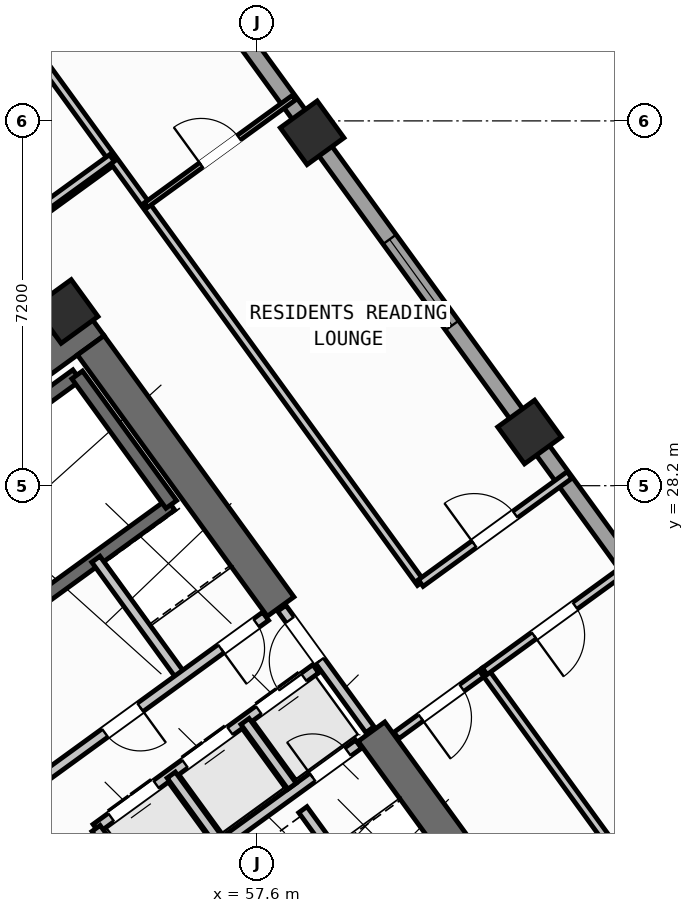
"""IFC4 building model, lengths in metres.
Left out: names, types, materials, properties, quantities, classifications, styles, units other than length and angle.
Written with IfcOpenShell. Run it as: python <this file> out.ifc"""

import sys

from ifc_helpers import new_model, si_unit, direction, frame, frame_2d, origin, origin_2d, place, context, subcontext, project, spatial, rectangle, hollow_rectangle, extrude, source, transform, mapped, element, fill, save


model = new_model("IFC4")
c1 = context("Model", 3, precision=1e-05, world=origin(), true_north=direction((0.0, 1.0)))
c2 = subcontext(c1, "Body", "Model", "MODEL_VIEW")
j1 = project(units=[si_unit("LENGTHUNIT", "METRE"), si_unit("PLANEANGLEUNIT", "RADIAN")], contexts=[c1])
p1 = place(None, origin())
s1 = spatial("IfcSite", under=j1, at=p1, CompositionType="ELEMENT")
p2 = place(p1, origin())
s2 = spatial("IfcBuilding", under=s1, at=p2, CompositionType="ELEMENT")
p3 = place(p2, frame((0.0, 0.0, 90.0)))
s3 = spatial("IfcBuildingStorey", under=s2, at=p3, CompositionType="ELEMENT", Elevation=90.0)
p4 = place(p3, frame((44.325, 24.113, 0.0), z_axis=(0.0, 0.0, 1.0), x_axis=(0.809012664862, 0.58779121131, 0.0)))
e1 = element("IfcWall", 1, at=p4, inside=s3, PredefinedType="SHEAR", context=c2, shape_type="SweptSolid", body=[
    extrude(rectangle(XDim=12.44, YDim=0.65, at=frame_2d((6.22, 0.0))), origin(), (0.0, 0.0, 1.0), 3.35),
])
p5 = place(p3, frame((61.929, 20.494, 0.0), z_axis=(0.0, 0.0, 1.0), x_axis=(-0.58782982593, 0.808984607855, 0.0)))
e2 = element("IfcWall", 2, at=p5, inside=s3, PredefinedType="SHEAR", context=c2, shape_type="SweptSolid", body=[
    extrude(rectangle(XDim=3.525, YDim=0.65, at=frame_2d((1.762, 0.0))), origin(), (0.0, 0.0, 1.0), 3.35),
])
p6 = place(p3, frame((58.064, 25.813, 0.0), z_axis=(0.0, 0.0, 1.0), x_axis=(-0.58777996584, 0.809020835181, 0.0)))
e3 = element("IfcWall", 3, at=p6, inside=s3, PredefinedType="SHEAR", context=c2, shape_type="SweptSolid", body=[
    extrude(rectangle(XDim=6.375, YDim=0.65, at=frame_2d((3.188, 0.0))), origin(), (0.0, 0.0, 1.0), 3.35),
])
m1 = source(origin(), c2, "Body", "SweptSolid", [
    extrude(hollow_rectangle(XDim=0.9, YDim=0.9, WallThickness=0.036, at=origin_2d()), origin(), (0.0, 0.0, 1.0), 3.6),
])
for number, where, z_axis, x_axis in (
    (4, (53.832, 31.638, 0.0), (0.0, 0.0, 1.0), (0.809, 0.588, 0.0)),
    (5, (62.977, 29.259, 0.0), (0.0, 0.0, 1.0), (0.809, 0.588, 0.0)),
    (6, (58.686, 35.165, 0.0), (0.0, 0.0, 1.0), (0.809, 0.588, 0.0)),
):
    element("IfcColumn", number, at=place(p3, frame(where, z_axis=z_axis, x_axis=x_axis)), inside=s3, PredefinedType="COLUMN", context=c2, shape_type="MappedRepresentation", body=[
        mapped(m1, transform((0.0, 0.0, 0.0), scale=1.0)),
    ])
p7 = place(p3, frame((42.207, 31.597, 0.0), z_axis=(0.0, 0.0, 1.0), x_axis=(0.809020333377, 0.587780656523, 0.0)))
e7 = element("IfcWall", 7, at=p7, inside=s3, PredefinedType="STANDARD", context=c2, shape_type="SweptSolid", body=[
    extrude(rectangle(XDim=15.223, YDim=0.32, at=frame_2d((7.611, 0.0))), origin(), (0.0, 0.0, 1.0), 3.35),
])
p8 = place(p7, frame((12.831, 0.0, 0.0)))
e8 = element("IfcOpeningElement", 8, at=p8, cuts=e7, PredefinedType="OPENING", context=c2, shape_type="SweptSolid", body=[
    extrude(rectangle(XDim=1.05, YDim=2.15, at=frame_2d((0.525, 1.075))), frame((0.0, 0.17, 0.0), z_axis=(0.0, -1.0, 0.0), x_axis=(1.0, 0.0, 0.0)), (0.0, 0.0, 1.0), 0.34),
])
p9 = place(p7, frame((1.484, 0.0, 0.8)))
e9 = element("IfcOpeningElement", 9, at=p9, cuts=e7, PredefinedType="OPENING", context=c2, shape_type="SweptSolid", body=[
    extrude(rectangle(XDim=2.1, YDim=1.55, at=frame_2d((1.05, 0.775))), frame((0.0, 0.17, 0.0), z_axis=(0.0, -1.0, 0.0), x_axis=(1.0, 0.0, 0.0)), (0.0, 0.0, 1.0), 0.34),
])
p10 = place(p7, frame((5.652, 0.0, 0.8)))
e10 = element("IfcOpeningElement", 10, at=p10, cuts=e7, PredefinedType="OPENING", context=c2, shape_type="SweptSolid", body=[
    extrude(rectangle(XDim=2.1, YDim=1.55, at=frame_2d((1.05, 0.775))), frame((0.0, 0.17, 0.0), z_axis=(0.0, -1.0, 0.0), x_axis=(1.0, 0.0, 0.0)), (0.0, 0.0, 1.0), 0.34),
])
p11 = place(p3, frame((54.81, 40.5, 0.0), z_axis=(0.0, 0.0, 1.0), x_axis=(0.587783625747, -0.809018176127, 0.0)))
e11 = element("IfcWall", 11, at=p11, inside=s3, PredefinedType="STANDARD", context=c2, shape_type="SweptSolid", body=[
    extrude(rectangle(XDim=21.587, YDim=0.32, at=frame_2d((10.794, 0.0))), origin(), (0.0, 0.0, 1.0), 2.775),
])
p12 = place(p11, frame((9.194, 0.0, 0.8)))
e12 = element("IfcOpeningElement", 12, at=p12, cuts=e11, PredefinedType="OPENING", context=c2, shape_type="SweptSolid", body=[
    extrude(rectangle(XDim=2.1, YDim=1.55, at=frame_2d((1.05, 0.775))), frame((0.0, 0.17, 0.0), z_axis=(0.0, -1.0, 0.0), x_axis=(1.0, 0.0, 0.0)), (0.0, 0.0, 1.0), 0.34),
])
p13 = place(p11, frame((18.159, 0.0, 0.85)))
e13 = element("IfcOpeningElement", 13, at=p13, cuts=e11, PredefinedType="OPENING", context=c2, shape_type="SweptSolid", body=[
    extrude(rectangle(XDim=1.8, YDim=1.5, at=frame_2d((0.9, 0.75))), frame((0.0, 0.17, 0.0), z_axis=(0.0, -1.0, 0.0), x_axis=(1.0, 0.0, 0.0)), (0.0, 0.0, 1.0), 0.34),
])
p14 = place(p3, frame((67.454, 22.747, 0.0), z_axis=(0.0, 0.0, 1.0), x_axis=(-0.809021120468, -0.587779573171, 0.0)))
e14 = element("IfcWall", 14, at=p14, inside=s3, PredefinedType="STANDARD", context=c2, shape_type="SweptSolid", body=[
    extrude(rectangle(XDim=17.588, YDim=0.32, at=frame_2d((8.794, 0.0))), origin(), (0.0, 0.0, 1.0), 3.35),
])
p15 = place(p14, frame((1.624, 0.0, 0.0)))
e15 = element("IfcOpeningElement", 15, at=p15, cuts=e14, PredefinedType="OPENING", context=c2, shape_type="SweptSolid", body=[
    extrude(rectangle(XDim=1.05, YDim=2.15, at=frame_2d((0.525, 1.075))), frame((0.0, 0.17, 0.0), z_axis=(0.0, -1.0, 0.0), x_axis=(1.0, 0.0, 0.0)), (0.0, 0.0, 1.0), 0.34),
])
p16 = place(p14, frame((8.144, 0.0, 0.8)))
e16 = element("IfcOpeningElement", 16, at=p16, cuts=e14, PredefinedType="OPENING", context=c2, shape_type="SweptSolid", body=[
    extrude(rectangle(XDim=2.1, YDim=1.55, at=frame_2d((1.05, 0.775))), frame((0.0, 0.17, 0.0), z_axis=(0.0, -1.0, 0.0), x_axis=(1.0, 0.0, 0.0)), (0.0, 0.0, 1.0), 0.34),
])
p17 = place(p14, frame((13.344, 0.0, 0.8)))
e17 = element("IfcOpeningElement", 17, at=p17, cuts=e14, PredefinedType="OPENING", context=c2, shape_type="SweptSolid", body=[
    extrude(rectangle(XDim=2.1, YDim=1.55, at=frame_2d((1.05, 0.775))), frame((0.0, 0.17, 0.0), z_axis=(0.0, -1.0, 0.0), x_axis=(1.0, 0.0, 0.0)), (0.0, 0.0, 1.0), 0.34),
])
p18 = place(p3, frame((48.006, 25.996, 0.0), z_axis=(0.0, 0.0, 1.0), x_axis=(0.80901903764, 0.587782439969, 0.0)))
e18 = element("IfcWall", 18, at=p18, inside=s3, PredefinedType="SHEAR", context=c2, shape_type="SweptSolid", body=[
    extrude(rectangle(XDim=7.46, YDim=0.26, at=frame_2d((3.73, 0.0))), origin(), (0.0, 0.0, 1.0), 3.35),
])
p19 = place(p3, frame((49.863, 23.44, 0.0), z_axis=(0.0, 0.0, 1.0), x_axis=(0.809003474932, 0.587803859759, 0.0)))
e19 = element("IfcWall", 19, at=p19, inside=s3, PredefinedType="SHEAR", context=c2, shape_type="SweptSolid", body=[
    extrude(rectangle(XDim=7.46, YDim=0.26, at=frame_2d((3.73, 0.0))), origin(), (0.0, 0.0, 1.0), 3.35),
])
p20 = place(p19, frame((0.36, 0.0, 0.0)))
e20 = element("IfcOpeningElement", 20, at=p20, cuts=e19, PredefinedType="OPENING", context=c2, shape_type="SweptSolid", body=[
    extrude(rectangle(XDim=0.86, YDim=2.05, at=frame_2d((0.43, 1.025))), frame((0.0, 0.14, 0.0), z_axis=(0.0, -1.0, 0.0), x_axis=(1.0, 0.0, 0.0)), (0.0, 0.0, 1.0), 0.28),
])
p21 = place(p3, frame((55.906, 27.831, 0.0), z_axis=(0.0, 0.0, 1.0), x_axis=(-0.587804123638, 0.809003283204, 0.0)))
e21 = element("IfcWall", 21, at=p21, inside=s3, PredefinedType="SHEAR", context=c2, shape_type="SweptSolid", body=[
    extrude(rectangle(XDim=3.16, YDim=0.26, at=frame_2d((1.58, 0.0))), origin(), (0.0, 0.0, 1.0), 3.35),
])
p22 = place(p3, frame((56.553, 20.884, 0.0), z_axis=(0.0, 0.0, 1.0), x_axis=(0.809035789462, 0.587759382205, 0.0)))
e22 = element("IfcWall", 22, at=p22, inside=s3, PredefinedType="STANDARD", context=c2, shape_type="SweptSolid", body=[
    extrude(rectangle(XDim=3.768, YDim=0.2, at=frame_2d((1.884, 0.0))), origin(), (0.0, 0.0, 1.0), 3.34),
])
p23 = place(p22, frame((2.65, 0.0, 0.0)))
e23 = element("IfcOpeningElement", 23, at=p23, cuts=e22, PredefinedType="OPENING", context=c2, shape_type="SweptSolid", body=[
    extrude(rectangle(XDim=0.86, YDim=2.05, at=frame_2d((0.43, 1.025))), frame((0.0, 0.11, 0.0), z_axis=(0.0, -1.0, 0.0), x_axis=(1.0, 0.0, 0.0)), (0.0, 0.0, 1.0), 0.22),
])
p24 = place(p3, frame((54.421, 21.436, 0.0), z_axis=(0.0, 0.0, 1.0), x_axis=(0.809013710463, 0.587789772183, 0.0)))
e24 = element("IfcWall", 24, at=p24, inside=s3, PredefinedType="STANDARD", context=c2, shape_type="SweptSolid", body=[
    extrude(rectangle(XDim=5.36, YDim=0.2, at=frame_2d((2.68, 0.0))), origin(), (0.0, 0.0, 1.0), 3.34),
])
p25 = place(p24, frame((0.37, 0.0, 0.0)))
e25 = element("IfcOpeningElement", 25, at=p25, cuts=e24, PredefinedType="OPENING", context=c2, shape_type="SweptSolid", body=[
    extrude(rectangle(XDim=1.1, YDim=2.15, at=frame_2d((0.55, 1.075))), frame((0.0, 0.11, 0.0), z_axis=(0.0, -1.0, 0.0), x_axis=(1.0, 0.0, 0.0)), (0.0, 0.0, 1.0), 0.22),
])
p26 = place(p24, frame((2.17, 0.0, 0.0)))
e26 = element("IfcOpeningElement", 26, at=p26, cuts=e24, PredefinedType="OPENING", context=c2, shape_type="SweptSolid", body=[
    extrude(rectangle(XDim=1.1, YDim=2.15, at=frame_2d((0.55, 1.075))), frame((0.0, 0.11, 0.0), z_axis=(0.0, -1.0, 0.0), x_axis=(1.0, 0.0, 0.0)), (0.0, 0.0, 1.0), 0.22),
])
p27 = place(p24, frame((3.97, 0.0, 0.0)))
e27 = element("IfcOpeningElement", 27, at=p27, cuts=e24, PredefinedType="OPENING", context=c2, shape_type="SweptSolid", body=[
    extrude(rectangle(XDim=1.1, YDim=2.15, at=frame_2d((0.55, 1.075))), frame((0.0, 0.11, 0.0), z_axis=(0.0, -1.0, 0.0), x_axis=(1.0, 0.0, 0.0)), (0.0, 0.0, 1.0), 0.22),
])
p28 = place(p3, frame((55.391, 20.102, 0.0), z_axis=(0.0, 0.0, 1.0), x_axis=(-0.58778447739, 0.809017557374, 0.0)))
e28 = element("IfcWall", 28, at=p28, inside=s3, PredefinedType="STANDARD", context=c2, shape_type="SweptSolid", body=[
    extrude(rectangle(XDim=1.65, YDim=0.2, at=frame_2d((0.825, 0.0))), origin(), (0.0, 0.0, 1.0), 3.34),
])
p29 = place(p3, frame((56.834, 21.212, 0.0), z_axis=(0.0, 0.0, 1.0), x_axis=(-0.58776738483, 0.809029975545, 0.0)))
e29 = element("IfcWall", 29, at=p29, inside=s3, PredefinedType="STANDARD", context=c2, shape_type="SweptSolid", body=[
    extrude(rectangle(XDim=1.58, YDim=0.2, at=frame_2d((0.79, 0.0))), origin(), (0.0, 0.0, 1.0), 3.34),
])
p30 = place(p3, frame((58.29, 22.27, 0.0), z_axis=(0.0, 0.0, 1.0), x_axis=(-0.587840865826, 0.808976585857, 0.0)))
e30 = element("IfcWall", 30, at=p30, inside=s3, PredefinedType="STANDARD", context=c2, shape_type="SweptSolid", body=[
    extrude(rectangle(XDim=1.58, YDim=0.2, at=frame_2d((0.79, 0.0))), origin(), (0.0, 0.0, 1.0), 3.34),
])
p31 = place(p3, frame((60.067, 19.655, 0.0), z_axis=(0.0, 0.0, 1.0), x_axis=(-0.587800520745, 0.809005900975, 0.0)))
e31 = element("IfcWall", 31, at=p31, inside=s3, PredefinedType="STANDARD", context=c2, shape_type="SweptSolid", body=[
    extrude(rectangle(XDim=2.66, YDim=0.2, at=frame_2d((1.33, 0.0))), origin(), (0.0, 0.0, 1.0), 3.34),
])
p32 = place(p3, frame((56.111, 24.419, 0.0), z_axis=(0.0, 0.0, 1.0), x_axis=(-0.58777848983, 0.809021907548, 0.0)))
e32 = element("IfcWall", 32, at=p32, inside=s3, PredefinedType="STANDARD", context=c2, shape_type="SweptSolid", body=[
    extrude(rectangle(XDim=2.88, YDim=0.2, at=frame_2d((1.44, 0.0))), origin(), (0.0, 0.0, 1.0), 3.34),
])
p33 = place(p3, frame((53.425, 22.468, 0.0), z_axis=(0.0, 0.0, 1.0), x_axis=(0.80902705128, 0.587771409902, 0.0)))
e33 = element("IfcWall", 33, at=p33, inside=s3, PredefinedType="STANDARD", context=c2, shape_type="SweptSolid", body=[
    extrude(rectangle(XDim=5.368, YDim=0.2, at=frame_2d((2.684, 0.0))), origin(), (0.0, 0.0, 1.0), 3.34),
])
p34 = place(p33, frame((4.28, 0.0, 0.0)))
e34 = element("IfcOpeningElement", 34, at=p34, cuts=e33, PredefinedType="OPENING", context=c2, shape_type="SweptSolid", body=[
    extrude(rectangle(XDim=0.86, YDim=2.05, at=frame_2d((0.43, 1.025))), frame((0.0, 0.11, 0.0), z_axis=(0.0, -1.0, 0.0), x_axis=(1.0, 0.0, 0.0)), (0.0, 0.0, 1.0), 0.22),
])
p35 = place(p33, frame((1.45, 0.0, 0.0)))
e35 = element("IfcOpeningElement", 35, at=p35, cuts=e33, PredefinedType="OPENING", context=c2, shape_type="SweptSolid", body=[
    extrude(rectangle(XDim=0.86, YDim=2.05, at=frame_2d((0.43, 1.025))), frame((0.0, 0.11, 0.0), z_axis=(0.0, -1.0, 0.0), x_axis=(1.0, 0.0, 0.0)), (0.0, 0.0, 1.0), 0.22),
])
p36 = place(p3, frame((59.827, 23.386, 0.0), z_axis=(0.0, 0.0, 1.0), x_axis=(-0.587803840107, 0.809003489211, 0.0)))
e36 = element("IfcWall", 36, at=p36, inside=s3, PredefinedType="STANDARD", context=c2, shape_type="SweptSolid", body=[
    extrude(rectangle(XDim=2.96, YDim=0.2, at=frame_2d((1.48, 0.0))), origin(), (0.0, 0.0, 1.0), 3.34),
])
p37 = place(p36, frame((1.68, 0.0, 0.0)))
e37 = element("IfcOpeningElement", 37, at=p37, cuts=e36, PredefinedType="OPENING", context=c2, shape_type="SweptSolid", body=[
    extrude(rectangle(XDim=1.0, YDim=2.1, at=frame_2d((0.5, 1.05))), frame((0.0, 0.11, 0.0), z_axis=(0.0, -1.0, 0.0), x_axis=(1.0, 0.0, 0.0)), (0.0, 0.0, 1.0), 0.22),
])
p38 = place(p3, frame((60.347, 23.27, 0.0), z_axis=(0.0, 0.0, 1.0), x_axis=(0.80899039758, 0.587821857898, 0.0)))
e38 = element("IfcWall", 38, at=p38, inside=s3, PredefinedType="PARTITIONING", context=c2, shape_type="SweptSolid", body=[
    extrude(rectangle(XDim=2.158, YDim=0.16, at=frame_2d((1.079, 0.0))), origin(), (0.0, 0.0, 1.0), 3.34),
])
p39 = place(p38, frame((0.598, 0.0, 0.0)))
e39 = element("IfcOpeningElement", 39, at=p39, cuts=e38, PredefinedType="OPENING", context=c2, shape_type="SweptSolid", body=[
    extrude(rectangle(XDim=1.0, YDim=2.1, at=frame_2d((0.5, 1.05))), frame((0.0, 0.09, 0.0), z_axis=(0.0, -1.0, 0.0), x_axis=(1.0, 0.0, 0.0)), (0.0, 0.0, 1.0), 0.18),
])
p40 = place(p3, frame((52.739, 33.143, 0.0), z_axis=(0.0, 0.0, 1.0), x_axis=(0.809000999347, 0.58780726693, 0.0)))
e40 = element("IfcWall", 40, at=p40, inside=s3, PredefinedType="PARTITIONING", context=c2, shape_type="SweptSolid", body=[
    extrude(rectangle(XDim=2.51, YDim=0.16, at=frame_2d((1.255, 0.0))), origin(), (0.0, 0.0, 1.0), 3.34),
])
p41 = place(p3, frame((64.709, 20.938, 0.0), z_axis=(0.0, 0.0, 1.0), x_axis=(-0.587773666605, 0.809025411743, 0.0)))
e41 = element("IfcWall", 41, at=p41, inside=s3, PredefinedType="PARTITIONING", context=c2, shape_type="SweptSolid", body=[
    extrude(rectangle(XDim=4.45, YDim=0.16, at=frame_2d((2.225, 0.0))), origin(), (0.0, 0.0, 1.0), 3.34),
])
p42 = place(p3, frame((60.829, 26.278, 0.0), z_axis=(0.0, 0.0, 1.0), x_axis=(-0.587777474174, 0.809022645451, 0.0)))
e42 = element("IfcWall", 42, at=p42, inside=s3, PredefinedType="PARTITIONING", context=c2, shape_type="SweptSolid", body=[
    extrude(rectangle(XDim=15.1, YDim=0.16, at=frame_2d((7.55, 0.0))), origin(), (0.0, 0.0, 1.0), 3.34),
])
p43 = place(p3, frame((62.093, 24.538, 0.0), z_axis=(0.0, 0.0, 1.0), x_axis=(0.809035546126, 0.58775971715, 0.0)))
e43 = element("IfcWall", 43, at=p43, inside=s3, PredefinedType="PARTITIONING", context=c2, shape_type="SweptSolid", body=[
    extrude(rectangle(XDim=3.63, YDim=0.16, at=frame_2d((1.815, 0.0))), origin(), (0.0, 0.0, 1.0), 3.34),
])
p44 = place(p43, frame((1.2, 0.0, 0.0)))
e44 = element("IfcOpeningElement", 44, at=p44, cuts=e43, PredefinedType="OPENING", context=c2, shape_type="SweptSolid", body=[
    extrude(rectangle(XDim=1.0, YDim=2.1, at=frame_2d((0.5, 1.05))), frame((0.0, 0.09, 0.0), z_axis=(0.0, -1.0, 0.0), x_axis=(1.0, 0.0, 0.0)), (0.0, 0.0, 1.0), 0.18),
])
p45 = place(p3, frame((60.829, 26.278, 0.0), z_axis=(0.0, 0.0, 1.0), x_axis=(0.809003564202, 0.587803736896, 0.0)))
e45 = element("IfcWall", 45, at=p45, inside=s3, PredefinedType="PARTITIONING", context=c2, shape_type="SweptSolid", body=[
    extrude(rectangle(XDim=3.63, YDim=0.16, at=frame_2d((1.815, 0.0))), origin(), (0.0, 0.0, 1.0), 3.34),
])
p46 = place(p45, frame((1.305, 0.0, 0.0)))
e46 = element("IfcOpeningElement", 46, at=p46, cuts=e45, PredefinedType="OPENING", context=c2, shape_type="SweptSolid", body=[
    extrude(rectangle(XDim=1.0, YDim=2.1, at=frame_2d((0.5, 1.05))), frame((0.0, 0.09, 0.0), z_axis=(0.0, -1.0, 0.0), x_axis=(1.0, 0.0, 0.0)), (0.0, 0.0, 1.0), 0.18),
])
p47 = place(p3, frame((55.409, 33.738, 0.0), z_axis=(0.0, 0.0, 1.0), x_axis=(0.809005039917, 0.58780170584, 0.0)))
e47 = element("IfcWall", 47, at=p47, inside=s3, PredefinedType="PARTITIONING", context=c2, shape_type="SweptSolid", body=[
    extrude(rectangle(XDim=3.61, YDim=0.11, at=frame_2d((1.805, 0.0))), origin(), (0.0, 0.0, 1.0), 3.34),
])
p48 = place(p47, frame((1.345, 0.0, 0.0)))
e48 = element("IfcOpeningElement", 48, at=p48, cuts=e47, PredefinedType="OPENING", context=c2, shape_type="SweptSolid", body=[
    extrude(rectangle(XDim=0.92, YDim=2.08, at=frame_2d((0.46, 1.04))), frame((0.0, 0.065, 0.0), z_axis=(0.0, -1.0, 0.0), x_axis=(1.0, 0.0, 0.0)), (0.0, 0.0, 1.0), 0.13),
])
p49 = place(p3, frame((42.866, 26.044, 0.0), z_axis=(0.0, 0.0, 1.0), x_axis=(0.809020254154, 0.587780765566, 0.0)))
e49 = element("IfcWall", 49, at=p49, inside=s3, PredefinedType="PARTITIONING", context=c2, shape_type="SweptSolid", body=[
    extrude(rectangle(XDim=14.67, YDim=0.16, at=frame_2d((7.335, 0.0))), origin(), (0.0, 0.0, 1.0), 3.34),
])
p50 = place(p49, frame((10.2, 0.0, 0.0)))
e50 = element("IfcOpeningElement", 50, at=p50, cuts=e49, PredefinedType="OPENING", context=c2, shape_type="SweptSolid", body=[
    extrude(rectangle(XDim=1.0, YDim=2.1, at=frame_2d((0.5, 1.05))), frame((0.0, 0.09, 0.0), z_axis=(0.0, -1.0, 0.0), x_axis=(1.0, 0.0, 0.0)), (0.0, 0.0, 1.0), 0.18),
])
m2 = source(origin(), c2, "Body", "SweptSolid", [
    extrude(rectangle(XDim=2.1, YDim=1.55, at=frame_2d((1.05, 0.775))), frame((0.0, 0.03, 0.0), z_axis=(0.0, -1.0, 0.0), x_axis=(1.0, 0.0, 0.0)), (0.0, 0.0, 1.0), 0.06),
])
p51 = place(p12, origin())
e51 = element("IfcWindow", 51, at=p51, inside=s3, PartitioningType="SINGLE_PANEL", PredefinedType="WINDOW", context=c2, shape_type="MappedRepresentation", body=[
    mapped(m2, transform((0.0, 0.0, 0.0), scale=1.0)),
])
fill(e12, e51)
m3 = source(origin(), c2, "Body", "SweptSolid", [
    extrude(rectangle(XDim=1.1, YDim=2.15, at=frame_2d((0.55, 1.075))), frame((0.0, 0.025, 0.0), z_axis=(0.0, -1.0, 0.0), x_axis=(1.0, 0.0, 0.0)), (0.0, 0.0, 1.0), 0.05),
])
p52 = place(p25, origin())
e52 = element("IfcDoor", 52, at=p52, inside=s3, OperationType="DOUBLE_DOOR_SLIDING", PredefinedType="DOOR", context=c2, shape_type="MappedRepresentation", body=[
    mapped(m3, transform((0.0, 0.0, 0.0), scale=1.0)),
])
fill(e25, e52)
p53 = place(p26, origin())
e53 = element("IfcDoor", 53, at=p53, inside=s3, OperationType="DOUBLE_DOOR_SLIDING", PredefinedType="DOOR", context=c2, shape_type="MappedRepresentation", body=[
    mapped(m3, transform((0.0, 0.0, 0.0), scale=1.0)),
])
fill(e26, e53)
p54 = place(p27, origin())
e54 = element("IfcDoor", 54, at=p54, inside=s3, OperationType="DOUBLE_DOOR_SLIDING", PredefinedType="DOOR", context=c2, shape_type="MappedRepresentation", body=[
    mapped(m3, transform((0.0, 0.0, 0.0), scale=1.0)),
])
fill(e27, e54)
m4 = source(origin(), c2, "Body", "SweptSolid", [
    extrude(rectangle(XDim=0.86, YDim=2.05, at=frame_2d((0.43, 1.025))), frame((0.0, 0.025, 0.0), z_axis=(0.0, -1.0, 0.0), x_axis=(1.0, 0.0, 0.0)), (0.0, 0.0, 1.0), 0.05),
])
p55 = place(p23, origin())
e55 = element("IfcDoor", 55, at=p55, inside=s3, OperationType="SINGLE_SWING_LEFT", PredefinedType="DOOR", context=c2, shape_type="MappedRepresentation", body=[
    mapped(m4, transform((0.0, 0.0, 0.0), scale=1.0)),
])
fill(e23, e55)
p56 = place(p34, frame((0.86, 0.0, 0.0), z_axis=(0.0, 0.0, 1.0), x_axis=(-1.0, 0.0, 0.0)))
e56 = element("IfcDoor", 56, at=p56, inside=s3, OperationType="SINGLE_SWING_RIGHT", PredefinedType="DOOR", context=c2, shape_type="MappedRepresentation", body=[
    mapped(m4, transform((0.0, 0.0, 0.0), scale=1.0)),
])
fill(e34, e56)
p57 = place(p35, frame((0.86, 0.0, 0.0), z_axis=(0.0, 0.0, 1.0), x_axis=(-1.0, 0.0, 0.0)))
e57 = element("IfcDoor", 57, at=p57, inside=s3, OperationType="SINGLE_SWING_LEFT", PredefinedType="DOOR", context=c2, shape_type="MappedRepresentation", body=[
    mapped(m4, transform((0.0, 0.0, 0.0), scale=1.0)),
])
fill(e35, e57)
m5 = source(origin(), c2, "Body", "SweptSolid", [
    extrude(rectangle(XDim=1.0, YDim=2.1, at=frame_2d((0.5, 1.05))), frame((0.0, 0.025, 0.0), z_axis=(0.0, -1.0, 0.0), x_axis=(1.0, 0.0, 0.0)), (0.0, 0.0, 1.0), 0.05),
])
p58 = place(p39, frame((1.0, 0.0, 0.0), z_axis=(0.0, 0.0, 1.0), x_axis=(-1.0, 0.0, 0.0)))
e58 = element("IfcDoor", 58, at=p58, inside=s3, OperationType="SINGLE_SWING_RIGHT", PredefinedType="DOOR", context=c2, shape_type="MappedRepresentation", body=[
    mapped(m5, transform((0.0, 0.0, 0.0), scale=1.0)),
])
fill(e39, e58)
p59 = place(p37, origin())
e59 = element("IfcDoor", 59, at=p59, inside=s3, OperationType="SINGLE_SWING_LEFT", PredefinedType="DOOR", context=c2, shape_type="MappedRepresentation", body=[
    mapped(m5, transform((0.0, 0.0, 0.0), scale=1.0)),
])
fill(e37, e59)
p60 = place(p46, origin())
e60 = element("IfcDoor", 60, at=p60, inside=s3, OperationType="SINGLE_SWING_LEFT", PredefinedType="DOOR", context=c2, shape_type="MappedRepresentation", body=[
    mapped(m5, transform((0.0, 0.0, 0.0), scale=1.0)),
])
fill(e46, e60)
m6 = source(origin(), c2, "Body", "SweptSolid", [
    extrude(rectangle(XDim=0.92, YDim=2.08, at=frame_2d((0.46, 1.04))), frame((0.0, 0.025, 0.0), z_axis=(0.0, -1.0, 0.0), x_axis=(1.0, 0.0, 0.0)), (0.0, 0.0, 1.0), 0.05),
])
p61 = place(p48, origin())
e61 = element("IfcDoor", 61, at=p61, inside=s3, OperationType="SINGLE_SWING_LEFT", PredefinedType="DOOR", context=c2, shape_type="MappedRepresentation", body=[
    mapped(m6, transform((0.0, 0.0, 0.0), scale=1.0)),
])
fill(e48, e61)
p62 = place(p44, frame((1.0, 0.0, 0.0), z_axis=(0.0, 0.0, 1.0), x_axis=(-1.0, 0.0, 0.0)))
e62 = element("IfcDoor", 62, at=p62, inside=s3, OperationType="SINGLE_SWING_RIGHT", PredefinedType="DOOR", context=c2, shape_type="MappedRepresentation", body=[
    mapped(m5, transform((0.0, 0.0, 0.0), scale=1.0)),
])
fill(e44, e62)
save(model, sys.argv[1])
